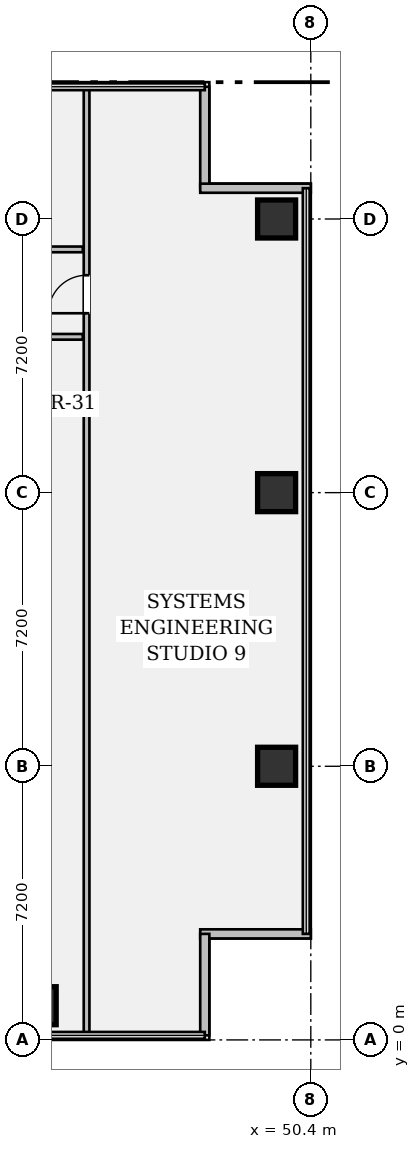
"""IFC4 building model, lengths in metres.
Left out: names, types, materials, properties, quantities, classifications, styles, units other than length and angle.
Written with IfcOpenShell. Run it as: python <this file> out.ifc"""

import sys

from ifc_helpers import new_model, si_unit, direction, frame, frame_2d, origin, origin_2d, place, context, subcontext, project, spatial, rectangle, hollow_rectangle, extrude, element, fill, save


model = new_model("IFC4")
c1 = context("Model", 3, precision=1e-05, world=origin(), true_north=direction((0.0, 1.0)))
c2 = subcontext(c1, "Body", "Model", "MODEL_VIEW")
j1 = project(units=[si_unit("LENGTHUNIT", "METRE"), si_unit("PLANEANGLEUNIT", "RADIAN")], contexts=[c1])
p1 = place(None, origin())
s1 = spatial("IfcSite", under=j1, at=p1, CompositionType="ELEMENT")
p2 = place(p1, origin())
s2 = spatial("IfcBuilding", under=s1, at=p2, CompositionType="ELEMENT")
p3 = place(p2, frame((0.0, 0.0, 54.25)))
s3 = spatial("IfcBuildingStorey", under=s2, at=p3, CompositionType="ELEMENT", Elevation=54.25)
for number, where, z_axis, x_axis in (
    (1, (43.2, 0.9, 0.0), (0.0, 0.0, 1.0), (1.0, 0.0, 0.0)),
    (2, (49.5, 7.2, 0.0), (0.0, 0.0, 1.0), (1.0, 0.0, 0.0)),
    (3, (49.5, 14.4, 0.0), (0.0, 0.0, 1.0), (1.0, 0.0, 0.0)),
    (4, (49.5, 21.6, 0.0), (0.0, 0.0, 1.0), (1.0, 0.0, 0.0)),
):
    element("IfcColumn", number, at=place(p3, frame(where, z_axis=z_axis, x_axis=x_axis)), inside=s3, PredefinedType="COLUMN", context=c2, shape_type="SweptSolid", body=[
        extrude(hollow_rectangle(XDim=1.0, YDim=1.0, WallThickness=0.065, at=origin_2d()), origin(), (0.0, 0.0, 1.0), 3.57),
    ])
p4 = place(p3, frame((47.61, 25.08, 0.0), z_axis=(0.0, 0.0, 1.0), x_axis=(0.0, -1.0, 0.0)))
e5 = element("IfcWall", 5, at=p4, inside=s3, PredefinedType="STANDARD", context=c2, shape_type="SweptSolid", body=[
    extrude(rectangle(XDim=2.67, YDim=0.24, at=frame_2d((1.335, 0.0))), origin(), (0.0, 0.0, 1.0), 3.57),
])
for number, where, z_axis, x_axis in (
    (6, (47.49, 22.41, 0.0), (0.0, 0.0, 1.0), (1.0, 0.0, 0.0)),
    (7, (50.4, 2.79, 0.0), (0.0, 0.0, 1.0), (-1.0, 0.0, 0.0)),
):
    element("IfcWall", number, at=place(p3, frame(where, z_axis=z_axis, x_axis=x_axis)), inside=s3, PredefinedType="STANDARD", context=c2, shape_type="SweptSolid", body=[
        extrude(rectangle(XDim=2.91, YDim=0.24, at=frame_2d((1.455, 0.0))), origin(), (0.0, 0.0, 1.0), 3.57),
    ])
p5 = place(p3, frame((47.61, 2.79, 0.0), z_axis=(0.0, 0.0, 1.0), x_axis=(0.0, -1.0, 0.0)))
e8 = element("IfcWall", 8, at=p5, inside=s3, PredefinedType="STANDARD", context=c2, shape_type="SweptSolid", body=[
    extrude(rectangle(XDim=2.67, YDim=0.24, at=frame_2d((1.335, 0.0))), origin(), (0.0, 0.0, 1.0), 3.57),
])
p6 = place(p3, frame((17.35, 18.5, 0.0), z_axis=(0.0, 0.0, 1.0), x_axis=(1.0, 0.0, 0.0)))
e9 = element("IfcWall", 9, at=p6, inside=s3, PredefinedType="PARTITIONING", context=c2, shape_type="SweptSolid", body=[
    extrude(rectangle(XDim=27.05, YDim=0.15, at=frame_2d((13.525, 0.0))), origin(), (0.0, 0.0, 1.0), 2.699),
])
p7 = place(p6, frame((2.52, 0.0, 0.0)))
e10 = element("IfcOpeningElement", 10, at=p7, cuts=e9, PredefinedType="OPENING", context=c2, shape_type="SweptSolid", body=[
    extrude(rectangle(XDim=0.95, YDim=2.15, at=frame_2d((0.475, 1.075))), frame((0.0, 0.087, 0.0), z_axis=(0.0, -1.0, 0.0), x_axis=(1.0, 0.0, 0.0)), (0.0, 0.0, 1.0), 0.174),
])
p8 = place(p6, frame((9.15, 0.0, 0.0)))
e11 = element("IfcOpeningElement", 11, at=p8, cuts=e9, PredefinedType="OPENING", context=c2, shape_type="SweptSolid", body=[
    extrude(rectangle(XDim=0.95, YDim=2.15, at=frame_2d((0.475, 1.075))), frame((0.0, 0.087, 0.0), z_axis=(0.0, -1.0, 0.0), x_axis=(1.0, 0.0, 0.0)), (0.0, 0.0, 1.0), 0.174),
])
p9 = place(p6, frame((16.35, 0.0, 0.0)))
e12 = element("IfcOpeningElement", 12, at=p9, cuts=e9, PredefinedType="OPENING", context=c2, shape_type="SweptSolid", body=[
    extrude(rectangle(XDim=0.95, YDim=2.15, at=frame_2d((0.475, 1.075))), frame((0.0, 0.087, 0.0), z_axis=(0.0, -1.0, 0.0), x_axis=(1.0, 0.0, 0.0)), (0.0, 0.0, 1.0), 0.174),
])
p10 = place(p6, frame((23.25, 0.0, 0.0)))
e13 = element("IfcOpeningElement", 13, at=p10, cuts=e9, PredefinedType="OPENING", context=c2, shape_type="SweptSolid", body=[
    extrude(rectangle(XDim=0.95, YDim=2.15, at=frame_2d((0.475, 1.075))), frame((0.0, 0.087, 0.0), z_axis=(0.0, -1.0, 0.0), x_axis=(1.0, 0.0, 0.0)), (0.0, 0.0, 1.0), 0.174),
])
p11 = place(p3, frame((17.35, 20.8, 0.0), z_axis=(0.0, 0.0, 1.0), x_axis=(1.0, 0.0, 0.0)))
e14 = element("IfcWall", 14, at=p11, inside=s3, PredefinedType="PARTITIONING", context=c2, shape_type="SweptSolid", body=[
    extrude(rectangle(XDim=27.05, YDim=0.15, at=frame_2d((13.525, 0.0))), origin(), (0.0, 0.0, 1.0), 2.699),
])
p12 = place(p11, frame((6.32, 0.0, 0.0)))
e15 = element("IfcOpeningElement", 15, at=p12, cuts=e14, PredefinedType="OPENING", context=c2, shape_type="SweptSolid", body=[
    extrude(rectangle(XDim=0.95, YDim=2.15, at=frame_2d((0.475, 1.075))), frame((0.0, 0.087, 0.0), z_axis=(0.0, -1.0, 0.0), x_axis=(1.0, 0.0, 0.0)), (0.0, 0.0, 1.0), 0.174),
])
p13 = place(p11, frame((20.01, 0.0, 0.0)))
e16 = element("IfcOpeningElement", 16, at=p13, cuts=e14, PredefinedType="OPENING", context=c2, shape_type="SweptSolid", body=[
    extrude(rectangle(XDim=0.95, YDim=2.15, at=frame_2d((0.475, 1.075))), frame((0.0, 0.087, 0.0), z_axis=(0.0, -1.0, 0.0), x_axis=(1.0, 0.0, 0.0)), (0.0, 0.0, 1.0), 0.174),
])
p14 = place(p3, frame((44.5, 0.12, 0.0), z_axis=(0.0, 0.0, 1.0), x_axis=(0.0, 1.0, 0.0)))
e17 = element("IfcWall", 17, at=p14, inside=s3, PredefinedType="PARTITIONING", context=c2, shape_type="SweptSolid", body=[
    extrude(rectangle(XDim=24.96, YDim=0.15, at=frame_2d((12.48, 0.0))), origin(), (0.0, 0.0, 1.0), 2.699),
])
p15 = place(p14, frame((19.0, 0.0, 0.0)))
e18 = element("IfcOpeningElement", 18, at=p15, cuts=e17, PredefinedType="OPENING", context=c2, shape_type="SweptSolid", body=[
    extrude(rectangle(XDim=1.0, YDim=2.15, at=frame_2d((0.5, 1.075))), frame((0.0, 0.087, 0.0), z_axis=(0.0, -1.0, 0.0), x_axis=(1.0, 0.0, 0.0)), (0.0, 0.0, 1.0), 0.174),
])
p16 = place(p15, origin())
e19 = element("IfcDoor", 19, at=p16, inside=s3, OperationType="SINGLE_SWING_LEFT", PredefinedType="DOOR", context=c2, shape_type="SweptSolid", body=[
    extrude(rectangle(XDim=1.0, YDim=2.15, at=frame_2d((0.5, 1.075))), frame((0.0, 0.025, 0.0), z_axis=(0.0, -1.0, 0.0), x_axis=(1.0, 0.0, 0.0)), (0.0, 0.0, 1.0), 0.05),
])
fill(e18, e19)
save(model, sys.argv[1])
